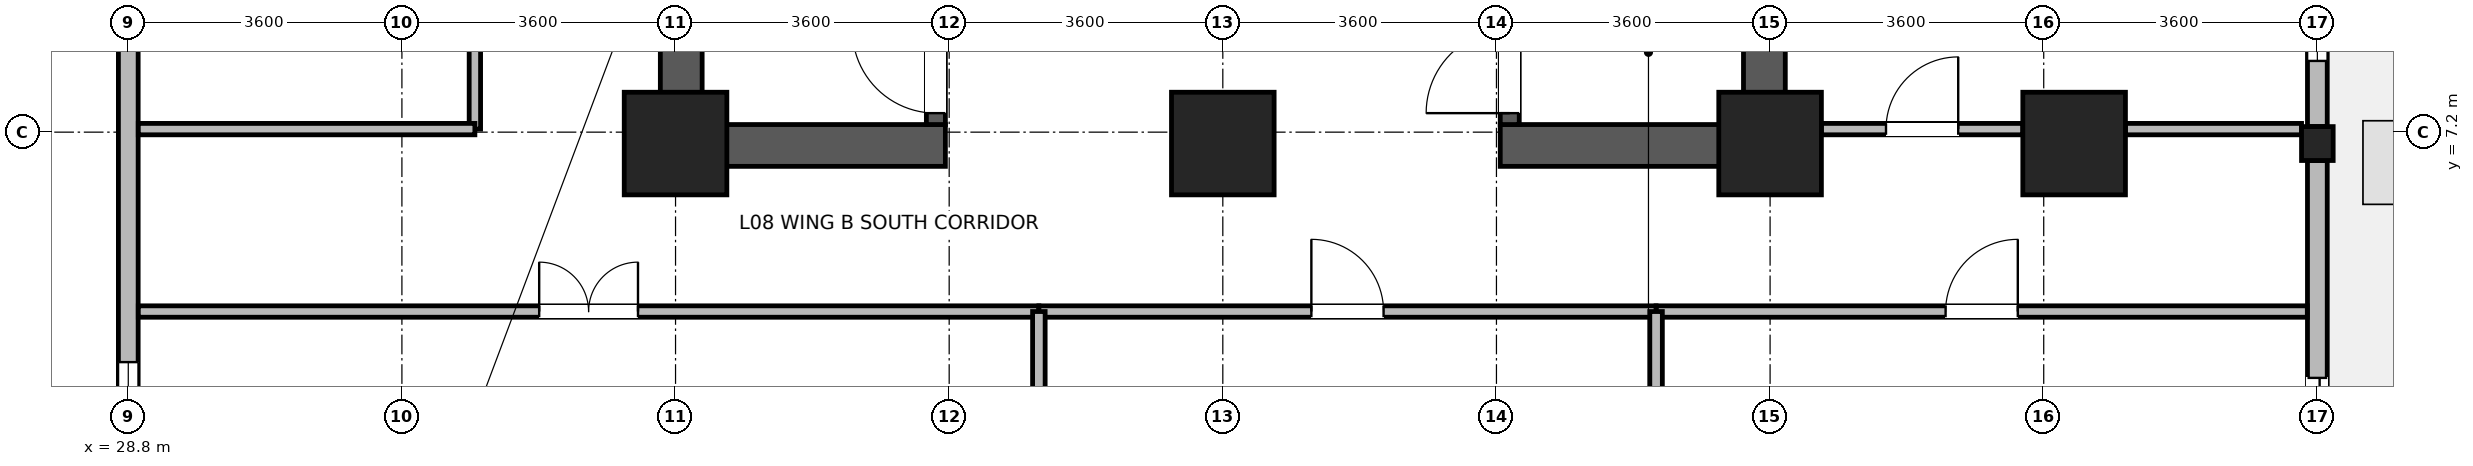
"""IFC4 building model, lengths in metres.
Left out: names, types, materials, properties, quantities, classifications, styles, units other than length and angle.
Written with IfcOpenShell. Run it as: python <this file> out.ifc"""

import sys

from ifc_helpers import new_model, si_unit, direction, frame, frame_2d, origin, origin_2d, place, context, subcontext, project, spatial, rectangle, i_section, extrude, source, transform, mapped, element, fill, save


model = new_model("IFC4")
c1 = context("Model", 3, precision=1e-05, world=origin(), true_north=direction((0.0, 1.0)))
c2 = subcontext(c1, "Body", "Model", "MODEL_VIEW")
j1 = project(units=[si_unit("LENGTHUNIT", "METRE"), si_unit("PLANEANGLEUNIT", "RADIAN")], contexts=[c1])
p1 = place(None, origin())
s1 = spatial("IfcSite", under=j1, at=p1, CompositionType="ELEMENT")
p2 = place(p1, origin())
s2 = spatial("IfcBuilding", under=s1, at=p2, CompositionType="ELEMENT")
p3 = place(p2, frame((0.0, 0.0, 36.4)))
s3 = spatial("IfcBuildingStorey", under=s2, at=p3, CompositionType="ELEMENT", Elevation=36.4)
for number, where, z_axis, x_axis in (
    (1, (36.075, 6.75, 0.0), (0.0, 0.0, 1.0), (0.0, 1.0, 0.0)),
    (2, (50.325, 6.75, 0.0), (0.0, 0.0, 1.0), (0.0, 1.0, 0.0)),
):
    element("IfcWall", number, at=place(p3, frame(where, z_axis=z_axis, x_axis=x_axis)), inside=s3, PredefinedType="SHEAR", context=c2, shape_type="SweptSolid", body=[
        extrude(rectangle(XDim=8.1, YDim=0.55, at=frame_2d((4.05, 0.0))), origin(), (0.0, 0.0, 1.0), 3.45),
    ])
for number, where, z_axis, x_axis in (
    (3, (36.35, 7.025, 0.0), (0.0, 0.0, 1.0), (1.0, 0.0, 0.0)),
    (4, (46.85, 7.025, 0.0), (0.0, 0.0, 1.0), (1.0, 0.0, 0.0)),
):
    element("IfcWall", number, at=place(p3, frame(where, z_axis=z_axis, x_axis=x_axis)), inside=s3, PredefinedType="SHEAR", context=c2, shape_type="SweptSolid", body=[
        extrude(rectangle(XDim=3.2, YDim=0.55, at=frame_2d((1.6, 0.0))), origin(), (0.0, 0.0, 1.0), 3.45),
    ])
p4 = place(p3, frame((39.425, 7.3, 0.0), z_axis=(0.0, 0.0, 1.0), x_axis=(0.0, 1.0, 0.0)))
e5 = element("IfcWall", 5, at=p4, inside=s3, PredefinedType="SHEAR", context=c2, shape_type="SweptSolid", body=[
    extrude(rectangle(XDim=7.0, YDim=0.25, at=frame_2d((3.5, 0.0))), origin(), (0.0, 0.0, 1.0), 3.45),
])
p5 = place(p4, frame((0.15, 0.0, 0.0)))
e6 = element("IfcOpeningElement", 6, at=p5, cuts=e5, PredefinedType="OPENING", context=c2, shape_type="SweptSolid", body=[
    extrude(rectangle(XDim=1.1, YDim=2.08, at=frame_2d((0.55, 1.04))), frame((0.0, 0.135, 0.0), z_axis=(0.0, -1.0, 0.0), x_axis=(1.0, 0.0, 0.0)), (0.0, 0.0, 1.0), 0.27),
])
p6 = place(p3, frame((46.975, 7.3, 0.0), z_axis=(0.0, 0.0, 1.0), x_axis=(0.0, 1.0, 0.0)))
e7 = element("IfcWall", 7, at=p6, inside=s3, PredefinedType="SHEAR", context=c2, shape_type="SweptSolid", body=[
    extrude(rectangle(XDim=7.0, YDim=0.25, at=frame_2d((3.5, 0.0))), origin(), (0.0, 0.0, 1.0), 3.45),
])
p7 = place(p6, frame((0.15, 0.0, 0.0)))
e8 = element("IfcOpeningElement", 8, at=p7, cuts=e7, PredefinedType="OPENING", context=c2, shape_type="SweptSolid", body=[
    extrude(rectangle(XDim=1.1, YDim=2.08, at=frame_2d((0.55, 1.04))), frame((0.0, 0.135, 0.0), z_axis=(0.0, -1.0, 0.0), x_axis=(1.0, 0.0, 0.0)), (0.0, 0.0, 1.0), 0.27),
])
m1 = source(origin(), c2, "Body", "SweptSolid", [
    extrude(rectangle(XDim=1.35, YDim=1.35, at=origin_2d()), origin(), (0.0, 0.0, 1.0), 3.7),
])
for number, where, z_axis, x_axis in (
    (9, (36.0, 7.05, 0.0), (0.0, 0.0, 1.0), (1.0, 0.0, 0.0)),
    (10, (43.2, 7.05, 0.0), (0.0, 0.0, 1.0), (1.0, 0.0, 0.0)),
    (11, (50.4, 7.05, 0.0), (0.0, 0.0, 1.0), (1.0, 0.0, 0.0)),
    (12, (54.4, 7.05, 0.0), (0.0, 0.0, 1.0), (1.0, 0.0, 0.0)),
):
    element("IfcColumn", number, at=place(p3, frame(where, z_axis=z_axis, x_axis=x_axis)), inside=s3, PredefinedType="COLUMN", context=c2, shape_type="MappedRepresentation", body=[
        mapped(m1, transform((0.0, 0.0, 0.0), x_axis=(1.0, 0.0, 0.0), y_axis=(0.0, 1.0, 0.0), z_axis=(0.0, 0.0, 1.0), scale=1.0)),
    ])
m2 = source(origin(), c2, "Body", "SweptSolid", [
    extrude(i_section(OverallWidth=0.416, OverallDepth=0.446, WebThickness=0.029, FlangeThickness=0.04, FilletRadius=0.015, at=origin_2d()), origin(), (0.0, 0.0, 1.0), 3.7),
])
p8 = place(p3, frame((57.6, 7.05, 0.0), z_axis=(0.0, 0.0, 1.0), x_axis=(1.0, 0.0, 0.0)))
e13 = element("IfcColumn", 13, at=p8, inside=s3, PredefinedType="COLUMN", context=c2, shape_type="MappedRepresentation", body=[
    mapped(m2, transform((0.0, 0.0, 0.0), x_axis=(1.0, 0.0, 0.0), y_axis=(0.0, 1.0, 0.0), z_axis=(0.0, 0.0, 1.0), scale=1.0)),
])
p9 = place(p3, frame((57.6, 6.826, 0.0), z_axis=(0.0, 0.0, 1.0), x_axis=(0.0, -1.0, 0.0)))
e14 = element("IfcWall", 14, at=p9, inside=s3, PredefinedType="STANDARD", context=c2, shape_type="SweptSolid", body=[
    extrude(rectangle(XDim=5.156, YDim=0.26, at=frame_2d((2.578, 0.0))), origin(), (0.0, 0.0, 1.0), 3.43),
])
p10 = place(p9, frame((2.859, 0.0, 0.0)))
e15 = element("IfcOpeningElement", 15, at=p10, cuts=e14, PredefinedType="OPENING", context=c2, shape_type="SweptSolid", body=[
    extrude(rectangle(XDim=1.5, YDim=2.15, at=frame_2d((0.75, 1.075))), frame((0.0, 0.14, 0.0), z_axis=(0.0, -1.0, 0.0), x_axis=(1.0, 0.0, 0.0)), (0.0, 0.0, 1.0), 0.28),
])
p11 = place(p3, frame((57.6, 14.326, 0.0), z_axis=(0.0, 0.0, 1.0), x_axis=(0.0, -1.0, 0.0)))
e16 = element("IfcWall", 16, at=p11, inside=s3, PredefinedType="STANDARD", context=c2, shape_type="SweptSolid", body=[
    extrude(rectangle(XDim=7.052, YDim=0.26, at=frame_2d((3.526, 0.0))), origin(), (0.0, 0.0, 1.0), 2.93),
])
p12 = place(p11, frame((0.863, 0.0, 0.85)))
e17 = element("IfcOpeningElement", 17, at=p12, cuts=e16, PredefinedType="OPENING", context=c2, shape_type="SweptSolid", body=[
    extrude(rectangle(XDim=1.8, YDim=1.85, at=frame_2d((0.9, 0.925))), frame((0.0, 0.14, 0.0), z_axis=(0.0, -1.0, 0.0), x_axis=(1.0, 0.0, 0.0)), (0.0, 0.0, 1.0), 0.28),
])
p13 = place(p11, frame((4.389, 0.0, 0.85)))
e18 = element("IfcOpeningElement", 18, at=p13, cuts=e16, PredefinedType="OPENING", context=c2, shape_type="SweptSolid", body=[
    extrude(rectangle(XDim=1.8, YDim=1.85, at=frame_2d((0.9, 0.925))), frame((0.0, 0.14, 0.0), z_axis=(0.0, -1.0, 0.0), x_axis=(1.0, 0.0, 0.0)), (0.0, 0.0, 1.0), 0.28),
])
p14 = place(p3, frame((28.8, 1.67, 0.0), z_axis=(0.0, 0.0, 1.0), x_axis=(0.0, 1.0, 0.0)))
e19 = element("IfcWall", 19, at=p14, inside=s3, PredefinedType="STANDARD", context=c2, shape_type="SweptSolid", body=[
    extrude(rectangle(XDim=19.254, YDim=0.26, at=frame_2d((9.627, 0.0))), origin(), (0.0, 0.0, 1.0), 3.43),
])
p15 = place(p14, frame((0.705, 0.0, 0.85)))
e20 = element("IfcOpeningElement", 20, at=p15, cuts=e19, PredefinedType="OPENING", context=c2, shape_type="SweptSolid", body=[
    extrude(rectangle(XDim=1.8, YDim=1.85, at=frame_2d((0.9, 0.925))), frame((0.0, 0.14, 0.0), z_axis=(0.0, -1.0, 0.0), x_axis=(1.0, 0.0, 0.0)), (0.0, 0.0, 1.0), 0.28),
])
p16 = place(p14, frame((7.123, 0.0, 0.85)))
e21 = element("IfcOpeningElement", 21, at=p16, cuts=e19, PredefinedType="OPENING", context=c2, shape_type="SweptSolid", body=[
    extrude(rectangle(XDim=1.8, YDim=1.85, at=frame_2d((0.9, 0.925))), frame((0.0, 0.14, 0.0), z_axis=(0.0, -1.0, 0.0), x_axis=(1.0, 0.0, 0.0)), (0.0, 0.0, 1.0), 0.28),
])
p17 = place(p14, frame((10.332, 0.0, 0.85)))
e22 = element("IfcOpeningElement", 22, at=p17, cuts=e19, PredefinedType="OPENING", context=c2, shape_type="SweptSolid", body=[
    extrude(rectangle(XDim=1.8, YDim=1.85, at=frame_2d((0.9, 0.925))), frame((0.0, 0.14, 0.0), z_axis=(0.0, -1.0, 0.0), x_axis=(1.0, 0.0, 0.0)), (0.0, 0.0, 1.0), 0.28),
])
p18 = place(p14, frame((13.541, 0.0, 0.85)))
e23 = element("IfcOpeningElement", 23, at=p18, cuts=e19, PredefinedType="OPENING", context=c2, shape_type="SweptSolid", body=[
    extrude(rectangle(XDim=1.8, YDim=1.85, at=frame_2d((0.9, 0.925))), frame((0.0, 0.14, 0.0), z_axis=(0.0, -1.0, 0.0), x_axis=(1.0, 0.0, 0.0)), (0.0, 0.0, 1.0), 0.28),
])
p19 = place(p14, frame((16.75, 0.0, 0.85)))
e24 = element("IfcOpeningElement", 24, at=p19, cuts=e19, PredefinedType="OPENING", context=c2, shape_type="SweptSolid", body=[
    extrude(rectangle(XDim=1.8, YDim=1.85, at=frame_2d((0.9, 0.925))), frame((0.0, 0.14, 0.0), z_axis=(0.0, -1.0, 0.0), x_axis=(1.0, 0.0, 0.0)), (0.0, 0.0, 1.0), 0.28),
])
p20 = place(p3, frame((28.932, 4.84, 0.0), z_axis=(0.0, 0.0, 1.0), x_axis=(1.0, 0.0, 0.0)))
e25 = element("IfcWall", 25, at=p20, inside=s3, PredefinedType="PARTITIONING", context=c2, shape_type="SweptSolid", body=[
    extrude(rectangle(XDim=11.848, YDim=0.15, at=frame_2d((5.924, 0.0))), origin(), (0.0, 0.0, 1.0), 3.43),
])
p21 = place(p20, frame((5.274, 0.0, 0.0)))
e26 = element("IfcOpeningElement", 26, at=p21, cuts=e25, PredefinedType="OPENING", context=c2, shape_type="SweptSolid", body=[
    extrude(rectangle(XDim=1.3, YDim=2.12, at=frame_2d((0.65, 1.06))), frame((0.0, 0.085, 0.0), z_axis=(0.0, -1.0, 0.0), x_axis=(1.0, 0.0, 0.0)), (0.0, 0.0, 1.0), 0.17),
])
p22 = place(p3, frame((48.9, 4.84, 0.0), z_axis=(0.0, 0.0, 1.0), x_axis=(1.0, 0.0, 0.0)))
e27 = element("IfcWall", 27, at=p22, inside=s3, PredefinedType="PARTITIONING", context=c2, shape_type="SweptSolid", body=[
    extrude(rectangle(XDim=8.568, YDim=0.15, at=frame_2d((4.284, 0.0))), origin(), (0.0, 0.0, 1.0), 3.43),
])
p23 = place(p22, frame((3.809, 0.0, 0.0)))
e28 = element("IfcOpeningElement", 28, at=p23, cuts=e27, PredefinedType="OPENING", context=c2, shape_type="SweptSolid", body=[
    extrude(rectangle(XDim=0.95, YDim=2.1, at=frame_2d((0.475, 1.05))), frame((0.0, 0.085, 0.0), z_axis=(0.0, -1.0, 0.0), x_axis=(1.0, 0.0, 0.0)), (0.0, 0.0, 1.0), 0.17),
])
p24 = place(p3, frame((40.78, 4.84, 0.0), z_axis=(0.0, 0.0, 1.0), x_axis=(1.0, 0.0, 0.0)))
e29 = element("IfcWall", 29, at=p24, inside=s3, PredefinedType="PARTITIONING", context=c2, shape_type="SweptSolid", body=[
    extrude(rectangle(XDim=8.12, YDim=0.15, at=frame_2d((4.06, 0.0))), origin(), (0.0, 0.0, 1.0), 3.43),
])
p25 = place(p24, frame((3.585, 0.0, 0.0)))
e30 = element("IfcOpeningElement", 30, at=p25, cuts=e29, PredefinedType="OPENING", context=c2, shape_type="SweptSolid", body=[
    extrude(rectangle(XDim=0.95, YDim=2.1, at=frame_2d((0.475, 1.05))), frame((0.0, 0.085, 0.0), z_axis=(0.0, -1.0, 0.0), x_axis=(1.0, 0.0, 0.0)), (0.0, 0.0, 1.0), 0.17),
])
p26 = place(p3, frame((33.36, 7.24, 0.0), z_axis=(0.0, 0.0, 1.0), x_axis=(0.0, 1.0, 0.0)))
e31 = element("IfcWall", 31, at=p26, inside=s3, PredefinedType="PARTITIONING", context=c2, shape_type="SweptSolid", body=[
    extrude(rectangle(XDim=7.26, YDim=0.15, at=frame_2d((3.63, 0.0))), origin(), (0.0, 0.0, 1.0), 3.43),
])
p27 = place(p26, frame((2.98, 0.0, 0.0)))
e32 = element("IfcOpeningElement", 32, at=p27, cuts=e31, PredefinedType="OPENING", context=c2, shape_type="SweptSolid", body=[
    extrude(rectangle(XDim=1.3, YDim=2.12, at=frame_2d((0.65, 1.06))), frame((0.0, 0.085, 0.0), z_axis=(0.0, -1.0, 0.0), x_axis=(1.0, 0.0, 0.0)), (0.0, 0.0, 1.0), 0.17),
])
p28 = place(p3, frame((51.075, 7.24, 0.0), z_axis=(0.0, 0.0, 1.0), x_axis=(1.0, 0.0, 0.0)))
e33 = element("IfcWall", 33, at=p28, inside=s3, PredefinedType="PARTITIONING", context=c2, shape_type="SweptSolid", body=[
    extrude(rectangle(XDim=2.65, YDim=0.15, at=frame_2d((1.325, 0.0))), origin(), (0.0, 0.0, 1.0), 2.78),
])
p29 = place(p28, frame((0.85, 0.0, 0.0)))
e34 = element("IfcOpeningElement", 34, at=p29, cuts=e33, PredefinedType="OPENING", context=c2, shape_type="SweptSolid", body=[
    extrude(rectangle(XDim=0.95, YDim=2.1, at=frame_2d((0.475, 1.05))), frame((0.0, 0.085, 0.0), z_axis=(0.0, -1.0, 0.0), x_axis=(1.0, 0.0, 0.0)), (0.0, 0.0, 1.0), 0.17),
])
p30 = place(p3, frame((55.075, 7.24, 0.0), z_axis=(0.0, 0.0, 1.0), x_axis=(1.0, 0.0, 0.0)))
e35 = element("IfcWall", 35, at=p30, inside=s3, PredefinedType="PARTITIONING", context=c2, shape_type="SweptSolid", body=[
    extrude(rectangle(XDim=2.317, YDim=0.15, at=frame_2d((1.159, 0.0))), origin(), (0.0, 0.0, 1.0), 2.78),
])
p31 = place(p3, frame((28.932, 7.24, 0.0), z_axis=(0.0, 0.0, 1.0), x_axis=(1.0, 0.0, 0.0)))
e36 = element("IfcWall", 36, at=p31, inside=s3, PredefinedType="PARTITIONING", context=c2, shape_type="SweptSolid", body=[
    extrude(rectangle(XDim=4.428, YDim=0.15, at=frame_2d((2.214, 0.0))), origin(), (0.0, 0.0, 1.0), 3.43),
])
for number, where, z_axis, x_axis in (
    (37, (40.78, 1.932, 0.0), (0.0, 0.0, 1.0), (0.0, 1.0, 0.0)),
    (38, (48.9, 1.932, 0.0), (0.0, 0.0, 1.0), (0.0, 1.0, 0.0)),
):
    element("IfcWall", number, at=place(p3, frame(where, z_axis=z_axis, x_axis=x_axis)), inside=s3, PredefinedType="PARTITIONING", context=c2, shape_type="SweptSolid", body=[
        extrude(rectangle(XDim=2.908, YDim=0.165, at=frame_2d((1.454, 0.0))), origin(), (0.0, 0.0, 1.0), 3.43),
    ])
p32 = place(p10, origin())
e39 = element("IfcDoor", 39, at=p32, inside=s3, OperationType="SLIDING_TO_LEFT", PredefinedType="DOOR", context=c2, shape_type="SweptSolid", body=[
    extrude(rectangle(XDim=1.5, YDim=2.15, at=frame_2d((0.75, 1.075))), frame((0.0, 0.025, 0.0), z_axis=(0.0, -1.0, 0.0), x_axis=(1.0, 0.0, 0.0)), (0.0, 0.0, 1.0), 0.05),
])
fill(e15, e39)
p33 = place(p13, origin())
e40 = element("IfcWindow", 40, at=p33, inside=s3, PartitioningType="SINGLE_PANEL", PredefinedType="WINDOW", context=c2, shape_type="SweptSolid", body=[
    extrude(rectangle(XDim=1.8, YDim=1.85, at=frame_2d((0.9, 0.925))), frame((0.0, 0.03, 0.0), z_axis=(0.0, -1.0, 0.0), x_axis=(1.0, 0.0, 0.0)), (0.0, 0.0, 1.0), 0.06),
])
fill(e18, e40)
p34 = place(p15, origin())
e41 = element("IfcWindow", 41, at=p34, inside=s3, PartitioningType="SINGLE_PANEL", PredefinedType="WINDOW", context=c2, shape_type="SweptSolid", body=[
    extrude(rectangle(XDim=1.8, YDim=1.85, at=frame_2d((0.9, 0.925))), frame((0.0, 0.03, 0.0), z_axis=(0.0, -1.0, 0.0), x_axis=(1.0, 0.0, 0.0)), (0.0, 0.0, 1.0), 0.06),
])
fill(e20, e41)
p35 = place(p5, origin())
e42 = element("IfcDoor", 42, at=p35, inside=s3, OperationType="SINGLE_SWING_RIGHT", PredefinedType="DOOR", context=c2, shape_type="SweptSolid", body=[
    extrude(rectangle(XDim=1.1, YDim=2.08, at=frame_2d((0.55, 1.04))), frame((0.0, 0.025, 0.0), z_axis=(0.0, -1.0, 0.0), x_axis=(1.0, 0.0, 0.0)), (0.0, 0.0, 1.0), 0.05),
])
fill(e6, e42)
p36 = place(p7, origin())
e43 = element("IfcDoor", 43, at=p36, inside=s3, OperationType="SINGLE_SWING_LEFT", PredefinedType="DOOR", context=c2, shape_type="SweptSolid", body=[
    extrude(rectangle(XDim=1.1, YDim=2.08, at=frame_2d((0.55, 1.04))), frame((0.0, 0.025, 0.0), z_axis=(0.0, -1.0, 0.0), x_axis=(1.0, 0.0, 0.0)), (0.0, 0.0, 1.0), 0.05),
])
fill(e8, e43)
p37 = place(p21, origin())
e44 = element("IfcDoor", 44, at=p37, inside=s3, OperationType="DOUBLE_DOOR_SINGLE_SWING", PredefinedType="DOOR", context=c2, shape_type="SweptSolid", body=[
    extrude(rectangle(XDim=1.3, YDim=2.12, at=frame_2d((0.65, 1.06))), frame((0.0, 0.025, 0.0), z_axis=(0.0, -1.0, 0.0), x_axis=(1.0, 0.0, 0.0)), (0.0, 0.0, 1.0), 0.05),
])
fill(e26, e44)
p38 = place(p23, origin())
e45 = element("IfcDoor", 45, at=p38, inside=s3, OperationType="SINGLE_SWING_RIGHT", PredefinedType="DOOR", context=c2, shape_type="SweptSolid", body=[
    extrude(rectangle(XDim=0.95, YDim=2.1, at=frame_2d((0.475, 1.05))), frame((0.0, 0.025, 0.0), z_axis=(0.0, -1.0, 0.0), x_axis=(1.0, 0.0, 0.0)), (0.0, 0.0, 1.0), 0.05),
])
fill(e28, e45)
p39 = place(p25, origin())
e46 = element("IfcDoor", 46, at=p39, inside=s3, OperationType="SINGLE_SWING_LEFT", PredefinedType="DOOR", context=c2, shape_type="SweptSolid", body=[
    extrude(rectangle(XDim=0.95, YDim=2.1, at=frame_2d((0.475, 1.05))), frame((0.0, 0.025, 0.0), z_axis=(0.0, -1.0, 0.0), x_axis=(1.0, 0.0, 0.0)), (0.0, 0.0, 1.0), 0.05),
])
fill(e30, e46)
p40 = place(p29, origin())
e47 = element("IfcDoor", 47, at=p40, inside=s3, OperationType="SINGLE_SWING_RIGHT", PredefinedType="DOOR", context=c2, shape_type="SweptSolid", body=[
    extrude(rectangle(XDim=0.95, YDim=2.1, at=frame_2d((0.475, 1.05))), frame((0.0, 0.025, 0.0), z_axis=(0.0, -1.0, 0.0), x_axis=(1.0, 0.0, 0.0)), (0.0, 0.0, 1.0), 0.05),
])
fill(e34, e47)
save(model, sys.argv[1])
